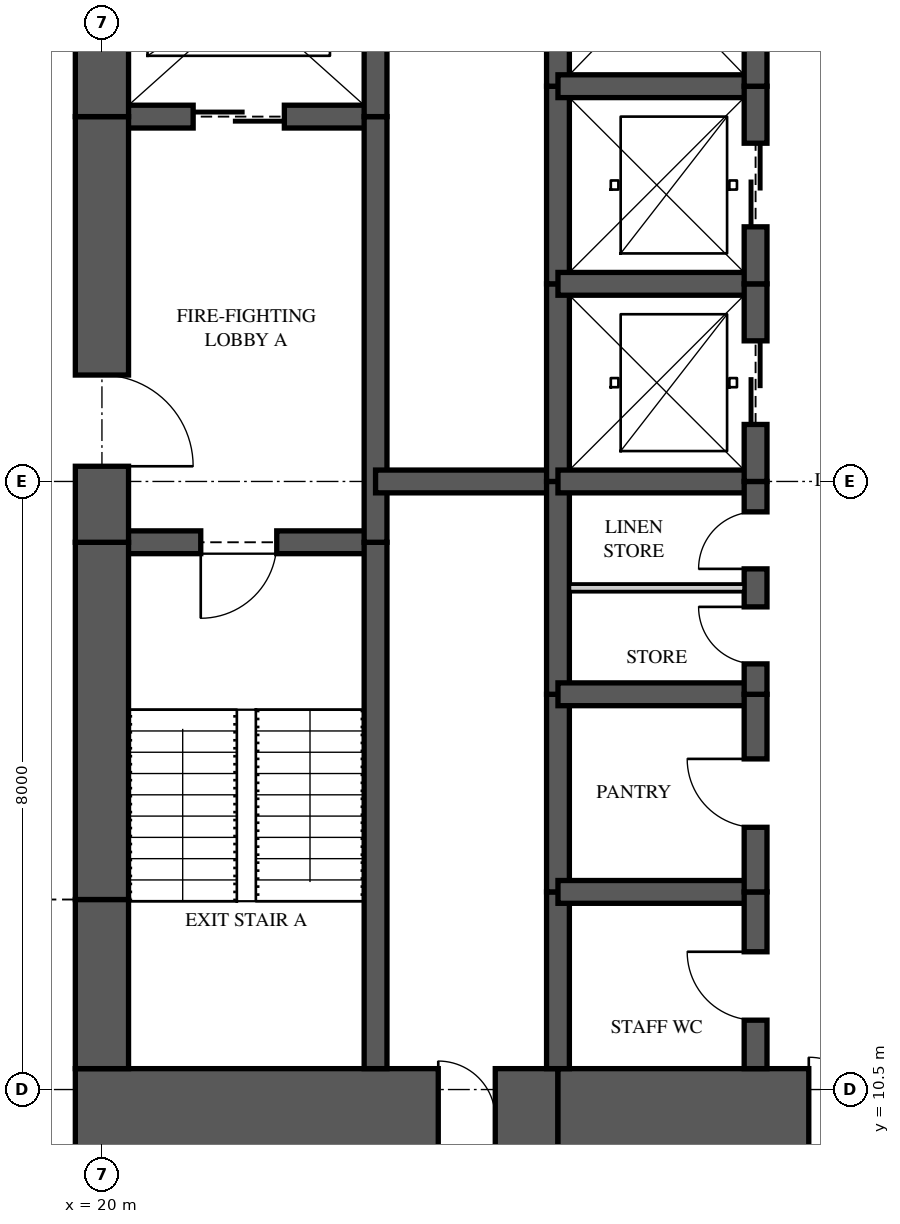
"""IFC4 building model, lengths in metres.
Left out: names, types, materials, properties, quantities, classifications, styles, units other than length and angle.
Written with IfcOpenShell. Run it as: python <this file> out.ifc"""

import sys

from ifc_helpers import new_model, si_unit, direction, frame, frame_2d, origin, place, context, subcontext, project, spatial, rectangle, extrude, element, fill, save


model = new_model("IFC4")
c1 = context("Model", 3, precision=1e-05, world=origin(), true_north=direction((0.0, 1.0)))
c2 = subcontext(c1, "Body", "Model", "MODEL_VIEW")
j1 = project(units=[si_unit("LENGTHUNIT", "METRE"), si_unit("PLANEANGLEUNIT", "RADIAN")], contexts=[c1])
p1 = place(None, origin())
s1 = spatial("IfcSite", under=j1, at=p1, CompositionType="ELEMENT")
p2 = place(p1, origin())
s2 = spatial("IfcBuilding", under=s1, at=p2, CompositionType="ELEMENT")
p3 = place(p2, frame((0.0, 0.0, 167.75)))
s3 = spatial("IfcBuildingStorey", under=s2, at=p3, CompositionType="ELEMENT", Elevation=167.75)
p4 = place(p3, frame((19.65, 10.125, 0.0), z_axis=(0.0, 0.0, 1.0), x_axis=(1.0, 0.0, 0.0)))
e1 = element("IfcWall", 1, at=p4, inside=s3, PredefinedType="SHEAR", context=c2, shape_type="SweptSolid", body=[
    extrude(rectangle(XDim=6.35, YDim=1.3, at=frame_2d((3.175, 0.0))), origin(), (0.0, 0.0, 1.0), 3.35),
])
p5 = place(p4, frame((4.775, 0.0, 0.0)))
e2 = element("IfcOpeningElement", 2, at=p5, cuts=e1, PredefinedType="OPENING", context=c2, shape_type="SweptSolid", body=[
    extrude(rectangle(XDim=0.75, YDim=2.1, at=frame_2d((0.375, 1.05))), frame((0.0, 0.66, 0.0), z_axis=(0.0, -1.0, 0.0), x_axis=(1.0, 0.0, 0.0)), (0.0, 0.0, 1.0), 1.32),
])
p6 = place(p3, frame((26.0, 10.125, 0.0), z_axis=(0.0, 0.0, 1.0), x_axis=(1.0, 0.0, 0.0)))
e3 = element("IfcWall", 3, at=p6, inside=s3, PredefinedType="SHEAR", context=c2, shape_type="SweptSolid", body=[
    extrude(rectangle(XDim=5.6, YDim=1.3, at=frame_2d((2.8, 0.0))), origin(), (0.0, 0.0, 1.0), 3.35),
])
p7 = place(p6, frame((3.3, 0.0, 0.0)))
e4 = element("IfcOpeningElement", 4, at=p7, cuts=e3, PredefinedType="OPENING", context=c2, shape_type="SweptSolid", body=[
    extrude(rectangle(XDim=1.6, YDim=2.1, at=frame_2d((0.8, 1.05))), frame((0.0, 0.66, 0.0), z_axis=(0.0, -1.0, 0.0), x_axis=(1.0, 0.0, 0.0)), (0.0, 0.0, 1.0), 1.32),
])
p8 = place(p3, frame((20.0, 26.225, 0.0), z_axis=(0.0, 0.0, 1.0), x_axis=(0.0, -1.0, 0.0)))
e5 = element("IfcWall", 5, at=p8, inside=s3, PredefinedType="SHEAR", context=c2, shape_type="SweptSolid", body=[
    extrude(rectangle(XDim=2.925, YDim=0.7, at=frame_2d((1.462, 0.0))), origin(), (0.0, 0.0, 1.0), 3.35),
])
p9 = place(p3, frame((20.0, 23.3, 0.0), z_axis=(0.0, 0.0, 1.0), x_axis=(0.0, -1.0, 0.0)))
e6 = element("IfcWall", 6, at=p9, inside=s3, PredefinedType="SHEAR", context=c2, shape_type="SweptSolid", body=[
    extrude(rectangle(XDim=5.6, YDim=0.7, at=frame_2d((2.8, 0.0))), origin(), (0.0, 0.0, 1.0), 3.35),
])
p10 = place(p9, frame((3.4, 0.0, 0.0)))
e7 = element("IfcOpeningElement", 7, at=p10, cuts=e6, PredefinedType="OPENING", context=c2, shape_type="SweptSolid", body=[
    extrude(rectangle(XDim=1.2, YDim=2.2, at=frame_2d((0.6, 1.1))), frame((0.0, 0.36, 0.0), z_axis=(0.0, -1.0, 0.0), x_axis=(1.0, 0.0, 0.0)), (0.0, 0.0, 1.0), 0.72),
])
p11 = place(p3, frame((20.0, 17.7, 0.0), z_axis=(0.0, 0.0, 1.0), x_axis=(0.0, -1.0, 0.0)))
e8 = element("IfcWall", 8, at=p11, inside=s3, PredefinedType="SHEAR", context=c2, shape_type="SweptSolid", body=[
    extrude(rectangle(XDim=4.7, YDim=0.7, at=frame_2d((2.35, 0.0))), origin(), (0.0, 0.0, 1.0), 3.35),
])
p12 = place(p3, frame((20.0, 13.0, 0.0), z_axis=(0.0, 0.0, 1.0), x_axis=(0.0, -1.0, 0.0)))
e9 = element("IfcWall", 9, at=p12, inside=s3, PredefinedType="SHEAR", context=c2, shape_type="SweptSolid", body=[
    extrude(rectangle(XDim=2.225, YDim=0.7, at=frame_2d((1.113, 0.0))), origin(), (0.0, 0.0, 1.0), 3.35),
])
p13 = place(p3, frame((23.6, 10.775, 0.0), z_axis=(0.0, 0.0, 1.0), x_axis=(0.0, 1.0, 0.0)))
e10 = element("IfcWall", 10, at=p13, inside=s3, PredefinedType="SHEAR", context=c2, shape_type="SweptSolid", body=[
    extrude(rectangle(XDim=6.925, YDim=0.3, at=frame_2d((3.462, 0.0))), origin(), (0.0, 0.0, 1.0), 3.35),
])
p14 = place(p3, frame((23.6, 17.7, 0.0), z_axis=(0.0, 0.0, 1.0), x_axis=(0.0, 1.0, 0.0)))
e11 = element("IfcWall", 11, at=p14, inside=s3, PredefinedType="SHEAR", context=c2, shape_type="SweptSolid", body=[
    extrude(rectangle(XDim=5.6, YDim=0.3, at=frame_2d((2.8, 0.0))), origin(), (0.0, 0.0, 1.0), 3.35),
])
p15 = place(p3, frame((23.6, 23.3, 0.0), z_axis=(0.0, 0.0, 1.0), x_axis=(0.0, 1.0, 0.0)))
e12 = element("IfcWall", 12, at=p15, inside=s3, PredefinedType="SHEAR", context=c2, shape_type="SweptSolid", body=[
    extrude(rectangle(XDim=2.925, YDim=0.3, at=frame_2d((1.462, 0.0))), origin(), (0.0, 0.0, 1.0), 3.35),
])
p16 = place(p3, frame((26.0, 10.775, 0.0), z_axis=(0.0, 0.0, 1.0), x_axis=(0.0, 1.0, 0.0)))
e13 = element("IfcWall", 13, at=p16, inside=s3, PredefinedType="SHEAR", context=c2, shape_type="SweptSolid", body=[
    extrude(rectangle(XDim=2.325, YDim=0.3, at=frame_2d((1.163, 0.0))), origin(), (0.0, 0.0, 1.0), 3.35),
])
p17 = place(p3, frame((26.0, 13.1, 0.0), z_axis=(0.0, 0.0, 1.0), x_axis=(0.0, 1.0, 0.0)))
e14 = element("IfcWall", 14, at=p17, inside=s3, PredefinedType="SHEAR", context=c2, shape_type="SweptSolid", body=[
    extrude(rectangle(XDim=2.6, YDim=0.3, at=frame_2d((1.3, 0.0))), origin(), (0.0, 0.0, 1.0), 3.35),
])
p18 = place(p3, frame((26.0, 15.7, 0.0), z_axis=(0.0, 0.0, 1.0), x_axis=(0.0, 1.0, 0.0)))
e15 = element("IfcWall", 15, at=p18, inside=s3, PredefinedType="SHEAR", context=c2, shape_type="SweptSolid", body=[
    extrude(rectangle(XDim=2.8, YDim=0.3, at=frame_2d((1.4, 0.0))), origin(), (0.0, 0.0, 1.0), 3.35),
])
p19 = place(p3, frame((26.0, 18.5, 0.0), z_axis=(0.0, 0.0, 1.0), x_axis=(0.0, 1.0, 0.0)))
e16 = element("IfcWall", 16, at=p19, inside=s3, PredefinedType="SHEAR", context=c2, shape_type="SweptSolid", body=[
    extrude(rectangle(XDim=2.6, YDim=0.3, at=frame_2d((1.3, 0.0))), origin(), (0.0, 0.0, 1.0), 3.35),
])
p20 = place(p3, frame((26.0, 21.1, 0.0), z_axis=(0.0, 0.0, 1.0), x_axis=(0.0, 1.0, 0.0)))
e17 = element("IfcWall", 17, at=p20, inside=s3, PredefinedType="SHEAR", context=c2, shape_type="SweptSolid", body=[
    extrude(rectangle(XDim=2.6, YDim=0.3, at=frame_2d((1.3, 0.0))), origin(), (0.0, 0.0, 1.0), 3.35),
])
p21 = place(p3, frame((26.0, 23.7, 0.0), z_axis=(0.0, 0.0, 1.0), x_axis=(0.0, 1.0, 0.0)))
e18 = element("IfcWall", 18, at=p21, inside=s3, PredefinedType="SHEAR", context=c2, shape_type="SweptSolid", body=[
    extrude(rectangle(XDim=2.525, YDim=0.3, at=frame_2d((1.263, 0.0))), origin(), (0.0, 0.0, 1.0), 3.35),
])
p22 = place(p3, frame((28.6, 10.775, 0.0), z_axis=(0.0, 0.0, 1.0), x_axis=(0.0, 1.0, 0.0)))
e19 = element("IfcWall", 19, at=p22, inside=s3, PredefinedType="SHEAR", context=c2, shape_type="SweptSolid", body=[
    extrude(rectangle(XDim=2.325, YDim=0.3, at=frame_2d((1.163, 0.0))), origin(), (0.0, 0.0, 1.0), 3.35),
])
p23 = place(p22, frame((0.637, 0.0, 0.0)))
e20 = element("IfcOpeningElement", 20, at=p23, cuts=e19, PredefinedType="OPENING", context=c2, shape_type="SweptSolid", body=[
    extrude(rectangle(XDim=0.9, YDim=2.1, at=frame_2d((0.45, 1.05))), frame((0.0, 0.16, 0.0), z_axis=(0.0, -1.0, 0.0), x_axis=(1.0, 0.0, 0.0)), (0.0, 0.0, 1.0), 0.32),
])
p24 = place(p3, frame((28.6, 13.1, 0.0), z_axis=(0.0, 0.0, 1.0), x_axis=(0.0, 1.0, 0.0)))
e21 = element("IfcWall", 21, at=p24, inside=s3, PredefinedType="SHEAR", context=c2, shape_type="SweptSolid", body=[
    extrude(rectangle(XDim=2.6, YDim=0.3, at=frame_2d((1.3, 0.0))), origin(), (0.0, 0.0, 1.0), 3.35),
])
p25 = place(p24, frame((0.85, 0.0, 0.0)))
e22 = element("IfcOpeningElement", 22, at=p25, cuts=e21, PredefinedType="OPENING", context=c2, shape_type="SweptSolid", body=[
    extrude(rectangle(XDim=0.9, YDim=2.1, at=frame_2d((0.45, 1.05))), frame((0.0, 0.16, 0.0), z_axis=(0.0, -1.0, 0.0), x_axis=(1.0, 0.0, 0.0)), (0.0, 0.0, 1.0), 0.32),
])
p26 = place(p3, frame((28.6, 15.7, 0.0), z_axis=(0.0, 0.0, 1.0), x_axis=(0.0, 1.0, 0.0)))
e23 = element("IfcWall", 23, at=p26, inside=s3, PredefinedType="SHEAR", context=c2, shape_type="SweptSolid", body=[
    extrude(rectangle(XDim=2.8, YDim=0.3, at=frame_2d((1.4, 0.0))), origin(), (0.0, 0.0, 1.0), 3.35),
])
p27 = place(p26, frame((0.4, 0.0, 0.0)))
e24 = element("IfcOpeningElement", 24, at=p27, cuts=e23, PredefinedType="OPENING", context=c2, shape_type="SweptSolid", body=[
    extrude(rectangle(XDim=0.75, YDim=2.1, at=frame_2d((0.375, 1.05))), frame((0.0, 0.16, 0.0), z_axis=(0.0, -1.0, 0.0), x_axis=(1.0, 0.0, 0.0)), (0.0, 0.0, 1.0), 0.32),
])
p28 = place(p26, frame((1.65, 0.0, 0.0)))
e25 = element("IfcOpeningElement", 25, at=p28, cuts=e23, PredefinedType="OPENING", context=c2, shape_type="SweptSolid", body=[
    extrude(rectangle(XDim=0.75, YDim=2.1, at=frame_2d((0.375, 1.05))), frame((0.0, 0.16, 0.0), z_axis=(0.0, -1.0, 0.0), x_axis=(1.0, 0.0, 0.0)), (0.0, 0.0, 1.0), 0.32),
])
p29 = place(p3, frame((28.6, 18.5, 0.0), z_axis=(0.0, 0.0, 1.0), x_axis=(0.0, 1.0, 0.0)))
e26 = element("IfcWall", 26, at=p29, inside=s3, PredefinedType="SHEAR", context=c2, shape_type="SweptSolid", body=[
    extrude(rectangle(XDim=2.6, YDim=0.3, at=frame_2d((1.3, 0.0))), origin(), (0.0, 0.0, 1.0), 3.35),
])
p30 = place(p29, frame((0.75, 0.0, 0.0)))
e27 = element("IfcOpeningElement", 27, at=p30, cuts=e26, PredefinedType="OPENING", context=c2, shape_type="SweptSolid", body=[
    extrude(rectangle(XDim=1.1, YDim=2.1, at=frame_2d((0.55, 1.05))), frame((0.0, 0.16, 0.0), z_axis=(0.0, -1.0, 0.0), x_axis=(1.0, 0.0, 0.0)), (0.0, 0.0, 1.0), 0.32),
])
p31 = place(p3, frame((28.6, 21.1, 0.0), z_axis=(0.0, 0.0, 1.0), x_axis=(0.0, 1.0, 0.0)))
e28 = element("IfcWall", 28, at=p31, inside=s3, PredefinedType="SHEAR", context=c2, shape_type="SweptSolid", body=[
    extrude(rectangle(XDim=2.6, YDim=0.3, at=frame_2d((1.3, 0.0))), origin(), (0.0, 0.0, 1.0), 3.35),
])
p32 = place(p31, frame((0.75, 0.0, 0.0)))
e29 = element("IfcOpeningElement", 29, at=p32, cuts=e28, PredefinedType="OPENING", context=c2, shape_type="SweptSolid", body=[
    extrude(rectangle(XDim=1.1, YDim=2.1, at=frame_2d((0.55, 1.05))), frame((0.0, 0.16, 0.0), z_axis=(0.0, -1.0, 0.0), x_axis=(1.0, 0.0, 0.0)), (0.0, 0.0, 1.0), 0.32),
])
p33 = place(p3, frame((28.6, 23.7, 0.0), z_axis=(0.0, 0.0, 1.0), x_axis=(0.0, 1.0, 0.0)))
e30 = element("IfcWall", 30, at=p33, inside=s3, PredefinedType="SHEAR", context=c2, shape_type="SweptSolid", body=[
    extrude(rectangle(XDim=2.525, YDim=0.3, at=frame_2d((1.263, 0.0))), origin(), (0.0, 0.0, 1.0), 3.35),
])
p34 = place(p33, frame((0.85, 0.0, 0.0)))
e31 = element("IfcOpeningElement", 31, at=p34, cuts=e30, PredefinedType="OPENING", context=c2, shape_type="SweptSolid", body=[
    extrude(rectangle(XDim=1.1, YDim=2.1, at=frame_2d((0.55, 1.05))), frame((0.0, 0.16, 0.0), z_axis=(0.0, -1.0, 0.0), x_axis=(1.0, 0.0, 0.0)), (0.0, 0.0, 1.0), 0.32),
])
p35 = place(p3, frame((20.0, 17.7, 0.0), z_axis=(0.0, 0.0, 1.0), x_axis=(1.0, 0.0, 0.0)))
e32 = element("IfcWall", 32, at=p35, inside=s3, PredefinedType="SHEAR", context=c2, shape_type="SweptSolid", body=[
    extrude(rectangle(XDim=3.6, YDim=0.3, at=frame_2d((1.8, 0.0))), origin(), (0.0, 0.0, 1.0), 3.35),
])
p36 = place(p35, frame((1.3, 0.0, 0.0)))
e33 = element("IfcOpeningElement", 33, at=p36, cuts=e32, PredefinedType="OPENING", context=c2, shape_type="SweptSolid", body=[
    extrude(rectangle(XDim=1.0, YDim=2.1, at=frame_2d((0.5, 1.05))), frame((0.0, 0.16, 0.0), z_axis=(0.0, -1.0, 0.0), x_axis=(1.0, 0.0, 0.0)), (0.0, 0.0, 1.0), 0.32),
])
p37 = place(p3, frame((20.0, 23.3, 0.0), z_axis=(0.0, 0.0, 1.0), x_axis=(1.0, 0.0, 0.0)))
e34 = element("IfcWall", 34, at=p37, inside=s3, PredefinedType="SHEAR", context=c2, shape_type="SweptSolid", body=[
    extrude(rectangle(XDim=3.6, YDim=0.3, at=frame_2d((1.8, 0.0))), origin(), (0.0, 0.0, 1.0), 3.35),
])
p38 = place(p37, frame((1.2, 0.0, 0.0)))
e35 = element("IfcOpeningElement", 35, at=p38, cuts=e34, PredefinedType="OPENING", context=c2, shape_type="SweptSolid", body=[
    extrude(rectangle(XDim=1.2, YDim=2.1, at=frame_2d((0.6, 1.05))), frame((0.0, 0.16, 0.0), z_axis=(0.0, -1.0, 0.0), x_axis=(1.0, 0.0, 0.0)), (0.0, 0.0, 1.0), 0.32),
])
p39 = place(p3, frame((23.6, 18.5, 0.0), z_axis=(0.0, 0.0, 1.0), x_axis=(1.0, 0.0, 0.0)))
e36 = element("IfcWall", 36, at=p39, inside=s3, PredefinedType="SHEAR", context=c2, shape_type="SweptSolid", body=[
    extrude(rectangle(XDim=2.4, YDim=0.3, at=frame_2d((1.2, 0.0))), origin(), (0.0, 0.0, 1.0), 3.35),
])
for number, where, z_axis, x_axis in (
    (37, (26.0, 13.1, 0.0), (0.0, 0.0, 1.0), (1.0, 0.0, 0.0)),
    (38, (26.0, 15.7, 0.0), (0.0, 0.0, 1.0), (1.0, 0.0, 0.0)),
    (39, (26.0, 18.5, 0.0), (0.0, 0.0, 1.0), (1.0, 0.0, 0.0)),
    (40, (26.0, 21.1, 0.0), (0.0, 0.0, 1.0), (1.0, 0.0, 0.0)),
    (41, (26.0, 23.7, 0.0), (0.0, 0.0, 1.0), (1.0, 0.0, 0.0)),
):
    element("IfcWall", number, at=place(p3, frame(where, z_axis=z_axis, x_axis=x_axis)), inside=s3, PredefinedType="SHEAR", context=c2, shape_type="SweptSolid", body=[
        extrude(rectangle(XDim=2.6, YDim=0.3, at=frame_2d((1.3, 0.0))), origin(), (0.0, 0.0, 1.0), 3.35),
    ])
p40 = place(p3, frame((26.15, 17.1, 0.0), z_axis=(0.0, 0.0, 1.0), x_axis=(1.0, 0.0, 0.0)))
e42 = element("IfcWall", 42, at=p40, inside=s3, PredefinedType="PARTITIONING", context=c2, shape_type="SweptSolid", body=[
    extrude(rectangle(XDim=2.3, YDim=0.1, at=frame_2d((1.15, 0.0))), origin(), (0.0, 0.0, 1.0), 3.11),
])
p41 = place(p36, frame((1.0, 0.0, 0.0), z_axis=(0.0, 0.0, 1.0), x_axis=(-1.0, 0.0, 0.0)))
e43 = element("IfcDoor", 43, at=p41, inside=s3, OperationType="SINGLE_SWING_RIGHT", PredefinedType="DOOR", context=c2, shape_type="SweptSolid", body=[
    extrude(rectangle(XDim=1.0, YDim=2.1, at=frame_2d((0.5, 1.05))), frame((0.0, 0.025, 0.0), z_axis=(0.0, -1.0, 0.0), x_axis=(1.0, 0.0, 0.0)), (0.0, 0.0, 1.0), 0.05),
])
fill(e33, e43)
p42 = place(p10, origin())
e44 = element("IfcDoor", 44, at=p42, inside=s3, OperationType="SINGLE_SWING_RIGHT", PredefinedType="DOOR", context=c2, shape_type="SweptSolid", body=[
    extrude(rectangle(XDim=1.2, YDim=2.2, at=frame_2d((0.6, 1.1))), frame((0.0, 0.025, 0.0), z_axis=(0.0, -1.0, 0.0), x_axis=(1.0, 0.0, 0.0)), (0.0, 0.0, 1.0), 0.05),
])
fill(e7, e44)
p43 = place(p38, origin())
e45 = element("IfcDoor", 45, at=p43, inside=s3, OperationType="SLIDING_TO_LEFT", PredefinedType="DOOR", context=c2, shape_type="SweptSolid", body=[
    extrude(rectangle(XDim=1.2, YDim=2.1, at=frame_2d((0.6, 1.05))), frame((0.0, 0.025, 0.0), z_axis=(0.0, -1.0, 0.0), x_axis=(1.0, 0.0, 0.0)), (0.0, 0.0, 1.0), 0.05),
])
fill(e35, e45)
p44 = place(p30, origin())
e46 = element("IfcDoor", 46, at=p44, inside=s3, OperationType="SLIDING_TO_LEFT", PredefinedType="DOOR", context=c2, shape_type="SweptSolid", body=[
    extrude(rectangle(XDim=1.1, YDim=2.1, at=frame_2d((0.55, 1.05))), frame((0.0, 0.025, 0.0), z_axis=(0.0, -1.0, 0.0), x_axis=(1.0, 0.0, 0.0)), (0.0, 0.0, 1.0), 0.05),
])
fill(e27, e46)
p45 = place(p32, origin())
e47 = element("IfcDoor", 47, at=p45, inside=s3, OperationType="SLIDING_TO_LEFT", PredefinedType="DOOR", context=c2, shape_type="SweptSolid", body=[
    extrude(rectangle(XDim=1.1, YDim=2.1, at=frame_2d((0.55, 1.05))), frame((0.0, 0.025, 0.0), z_axis=(0.0, -1.0, 0.0), x_axis=(1.0, 0.0, 0.0)), (0.0, 0.0, 1.0), 0.05),
])
fill(e29, e47)
p46 = place(p23, origin())
e48 = element("IfcDoor", 48, at=p46, inside=s3, OperationType="SINGLE_SWING_RIGHT", PredefinedType="DOOR", context=c2, shape_type="SweptSolid", body=[
    extrude(rectangle(XDim=0.9, YDim=2.1, at=frame_2d((0.45, 1.05))), frame((0.0, 0.025, 0.0), z_axis=(0.0, -1.0, 0.0), x_axis=(1.0, 0.0, 0.0)), (0.0, 0.0, 1.0), 0.05),
])
fill(e20, e48)
p47 = place(p25, origin())
e49 = element("IfcDoor", 49, at=p47, inside=s3, OperationType="SINGLE_SWING_RIGHT", PredefinedType="DOOR", context=c2, shape_type="SweptSolid", body=[
    extrude(rectangle(XDim=0.9, YDim=2.1, at=frame_2d((0.45, 1.05))), frame((0.0, 0.025, 0.0), z_axis=(0.0, -1.0, 0.0), x_axis=(1.0, 0.0, 0.0)), (0.0, 0.0, 1.0), 0.05),
])
fill(e22, e49)
p48 = place(p27, origin())
e50 = element("IfcDoor", 50, at=p48, inside=s3, OperationType="SINGLE_SWING_RIGHT", PredefinedType="DOOR", context=c2, shape_type="SweptSolid", body=[
    extrude(rectangle(XDim=0.75, YDim=2.1, at=frame_2d((0.375, 1.05))), frame((0.0, 0.025, 0.0), z_axis=(0.0, -1.0, 0.0), x_axis=(1.0, 0.0, 0.0)), (0.0, 0.0, 1.0), 0.05),
])
fill(e24, e50)
p49 = place(p28, origin())
e51 = element("IfcDoor", 51, at=p49, inside=s3, OperationType="SINGLE_SWING_LEFT", PredefinedType="DOOR", context=c2, shape_type="SweptSolid", body=[
    extrude(rectangle(XDim=0.75, YDim=2.1, at=frame_2d((0.375, 1.05))), frame((0.0, 0.025, 0.0), z_axis=(0.0, -1.0, 0.0), x_axis=(1.0, 0.0, 0.0)), (0.0, 0.0, 1.0), 0.05),
])
fill(e25, e51)
p50 = place(p7, origin())
e52 = element("IfcDoor", 52, at=p50, inside=s3, OperationType="DOUBLE_DOOR_SINGLE_SWING", PredefinedType="DOOR", context=c2, shape_type="SweptSolid", body=[
    extrude(rectangle(XDim=1.6, YDim=2.1, at=frame_2d((0.8, 1.05))), frame((0.0, 0.025, 0.0), z_axis=(0.0, -1.0, 0.0), x_axis=(1.0, 0.0, 0.0)), (0.0, 0.0, 1.0), 0.05),
])
fill(e4, e52)
p51 = place(p5, origin())
e53 = element("IfcDoor", 53, at=p51, inside=s3, OperationType="SINGLE_SWING_LEFT", PredefinedType="DOOR", context=c2, shape_type="SweptSolid", body=[
    extrude(rectangle(XDim=0.75, YDim=2.1, at=frame_2d((0.375, 1.05))), frame((0.0, 0.025, 0.0), z_axis=(0.0, -1.0, 0.0), x_axis=(1.0, 0.0, 0.0)), (0.0, 0.0, 1.0), 0.05),
])
fill(e2, e53)
save(model, sys.argv[1])
